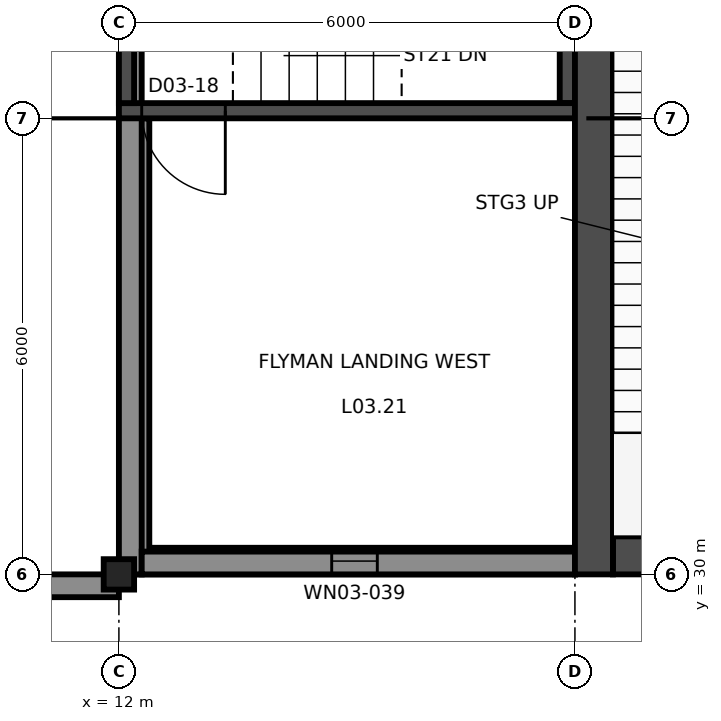
"""IFC4 building model, lengths in metres.
Left out: names, types, materials, properties, quantities, classifications, styles, units other than length and angle.
Written with IfcOpenShell. Run it as: python <this file> out.ifc"""

import sys

from ifc_helpers import new_model, si_unit, direction, frame, frame_2d, origin, origin_2d, place, context, subcontext, project, spatial, rectangle, extrude, element, fill, save


model = new_model("IFC4")
c1 = context("Model", 3, precision=1e-05, world=origin(), true_north=direction((0.0, 1.0)))
c2 = subcontext(c1, "Body", "Model", "MODEL_VIEW")
j1 = project(units=[si_unit("LENGTHUNIT", "METRE"), si_unit("PLANEANGLEUNIT", "RADIAN")], contexts=[c1])
p1 = place(None, origin())
s1 = spatial("IfcSite", under=j1, at=p1, CompositionType="ELEMENT")
p2 = place(p1, origin())
s2 = spatial("IfcBuilding", under=s1, at=p2, CompositionType="ELEMENT")
p3 = place(p2, frame((0.0, 0.0, 16.5)))
s3 = spatial("IfcBuildingStorey", under=s2, at=p3, CompositionType="ELEMENT", Elevation=16.5)
p4 = place(p3, frame((12.0, 30.0, 0.0), z_axis=(0.0, 0.0, 1.0), x_axis=(1.0, 0.0, 0.0)))
e1 = element("IfcColumn", 1, at=p4, inside=s3, PredefinedType="COLUMN", context=c2, shape_type="SweptSolid", body=[
    extrude(rectangle(XDim=0.4, YDim=0.4, at=origin_2d()), origin(), (0.0, 0.0, 1.0), 4.5),
])
p5 = place(p3, frame((12.0, 36.1, 0.0), z_axis=(0.0, 0.0, 1.0), x_axis=(1.0, 0.0, 0.0)))
e2 = element("IfcWall", 2, at=p5, inside=s3, PredefinedType="SHEAR", context=c2, shape_type="SweptSolid", body=[
    extrude(rectangle(XDim=6.0, YDim=0.2, at=frame_2d((3.0, 0.0))), origin(), (0.0, 0.0, 1.0), 4.5),
])
p6 = place(p5, frame((0.3, 0.0, 0.0)))
e3 = element("IfcOpeningElement", 3, at=p6, cuts=e2, PredefinedType="OPENING", context=c2, shape_type="SweptSolid", body=[
    extrude(rectangle(XDim=1.1, YDim=2.2, at=frame_2d((0.55, 1.1))), frame((0.0, 0.11, 0.0), z_axis=(0.0, -1.0, 0.0), x_axis=(1.0, 0.0, 0.0)), (0.0, 0.0, 1.0), 0.22),
])
for number, where, z_axis, x_axis in (
    (4, (12.1, 36.2, 0.0), (0.0, 0.0, 1.0), (0.0, 1.0, 0.0)),
    (5, (17.9, 36.2, 0.0), (0.0, 0.0, 1.0), (0.0, 1.0, 0.0)),
):
    element("IfcWall", number, at=place(p3, frame(where, z_axis=z_axis, x_axis=x_axis)), inside=s3, PredefinedType="SHEAR", context=c2, shape_type="SweptSolid", body=[
        extrude(rectangle(XDim=5.6, YDim=0.2, at=frame_2d((2.8, 0.0))), origin(), (0.0, 0.0, 1.0), 4.5),
    ])
p7 = place(p3, frame((18.25, 30.0, 0.0), z_axis=(0.0, 0.0, 1.0), x_axis=(0.0, 1.0, 0.0)))
e6 = element("IfcWall", 6, at=p7, inside=s3, PredefinedType="SHEAR", context=c2, shape_type="SweptSolid", body=[
    extrude(rectangle(XDim=24.0, YDim=0.5, at=frame_2d((12.0, 0.0))), origin(), (0.0, 0.0, 1.0), 6.5),
])
p8 = place(p3, frame((18.5, 30.25, 0.0), z_axis=(0.0, 0.0, 1.0), x_axis=(1.0, 0.0, 0.0)))
e7 = element("IfcWall", 7, at=p8, inside=s3, PredefinedType="SHEAR", context=c2, shape_type="SweptSolid", body=[
    extrude(rectangle(XDim=29.0, YDim=0.5, at=frame_2d((14.5, 0.0))), origin(), (0.0, 0.0, 1.0), 6.5),
])
p9 = place(p3, frame((18.0, 30.175, 0.0), z_axis=(0.0, 0.0, 1.0), x_axis=(-1.0, 0.0, 0.0)))
e8 = element("IfcWall", 8, at=p9, inside=s3, PredefinedType="SOLIDWALL", context=c2, shape_type="SweptSolid", body=[
    extrude(rectangle(XDim=5.8, YDim=0.35, at=frame_2d((2.9, 0.0))), origin(), (0.0, 0.0, 1.0), 3.9),
])
p10 = place(p9, frame((2.6, 0.0, 1.5)))
e9 = element("IfcOpeningElement", 9, at=p10, cuts=e8, PredefinedType="OPENING", context=c2, shape_type="SweptSolid", body=[
    extrude(rectangle(XDim=0.6, YDim=2.2, at=frame_2d((0.3, 1.1))), frame((0.0, 0.185, 0.0), z_axis=(0.0, -1.0, 0.0), x_axis=(1.0, 0.0, 0.0)), (0.0, 0.0, 1.0), 0.37),
])
p11 = place(p3, frame((12.225, 30.2, 0.0), z_axis=(0.0, 0.0, 1.0), x_axis=(0.0, 1.0, 0.0)))
e10 = element("IfcWall", 10, at=p11, inside=s3, PredefinedType="SOLIDWALL", context=c2, shape_type="SweptSolid", body=[
    extrude(rectangle(XDim=5.8, YDim=0.35, at=frame_2d((2.9, 0.0))), origin(), (0.0, 0.0, 1.0), 3.9),
])
p12 = place(p3, frame((12.15, 30.0, 4.5), z_axis=(0.0, 0.0, 1.0), x_axis=(0.0, 1.0, 0.0)))
e11 = element("IfcWall", 11, at=p12, inside=s3, PredefinedType="PARAPET", context=c2, shape_type="SweptSolid", body=[
    extrude(rectangle(XDim=60.0, YDim=0.3, at=frame_2d((30.0, 0.0))), origin(), (0.0, 0.0, 1.0), 1.2),
])
p13 = place(p3, frame((12.3, 30.15, 4.5), z_axis=(0.0, 0.0, 1.0), x_axis=(1.0, 0.0, 0.0)))
e12 = element("IfcWall", 12, at=p13, inside=s3, PredefinedType="PARAPET", context=c2, shape_type="SweptSolid", body=[
    extrude(rectangle(XDim=5.7, YDim=0.3, at=frame_2d((2.85, 0.0))), origin(), (0.0, 0.0, 1.0), 1.2),
])
p14 = place(p3, frame((0.3, 29.85, 0.0), z_axis=(0.0, 0.0, 1.0), x_axis=(1.0, 0.0, 0.0)))
e13 = element("IfcWall", 13, at=p14, inside=s3, PredefinedType="PARAPET", context=c2, shape_type="SweptSolid", body=[
    extrude(rectangle(XDim=11.7, YDim=0.3, at=frame_2d((5.85, 0.0))), origin(), (0.0, 0.0, 1.0), 1.2),
])
p15 = place(p10, origin())
e14 = element("IfcWindow", 14, at=p15, inside=s3, PartitioningType="SINGLE_PANEL", PredefinedType="WINDOW", context=c2, shape_type="SweptSolid", body=[
    extrude(rectangle(XDim=0.6, YDim=2.2, at=frame_2d((0.3, 1.1))), frame((0.0, 0.03, 0.0), z_axis=(0.0, -1.0, 0.0), x_axis=(1.0, 0.0, 0.0)), (0.0, 0.0, 1.0), 0.06),
])
fill(e9, e14)
p16 = place(p6, origin())
e15 = element("IfcDoor", 15, at=p16, inside=s3, OperationType="SINGLE_SWING_RIGHT", PredefinedType="DOOR", context=c2, shape_type="SweptSolid", body=[
    extrude(rectangle(XDim=1.1, YDim=2.2, at=frame_2d((0.55, 1.1))), frame((0.0, 0.025, 0.0), z_axis=(0.0, -1.0, 0.0), x_axis=(1.0, 0.0, 0.0)), (0.0, 0.0, 1.0), 0.05),
])
fill(e3, e15)
save(model, sys.argv[1])
